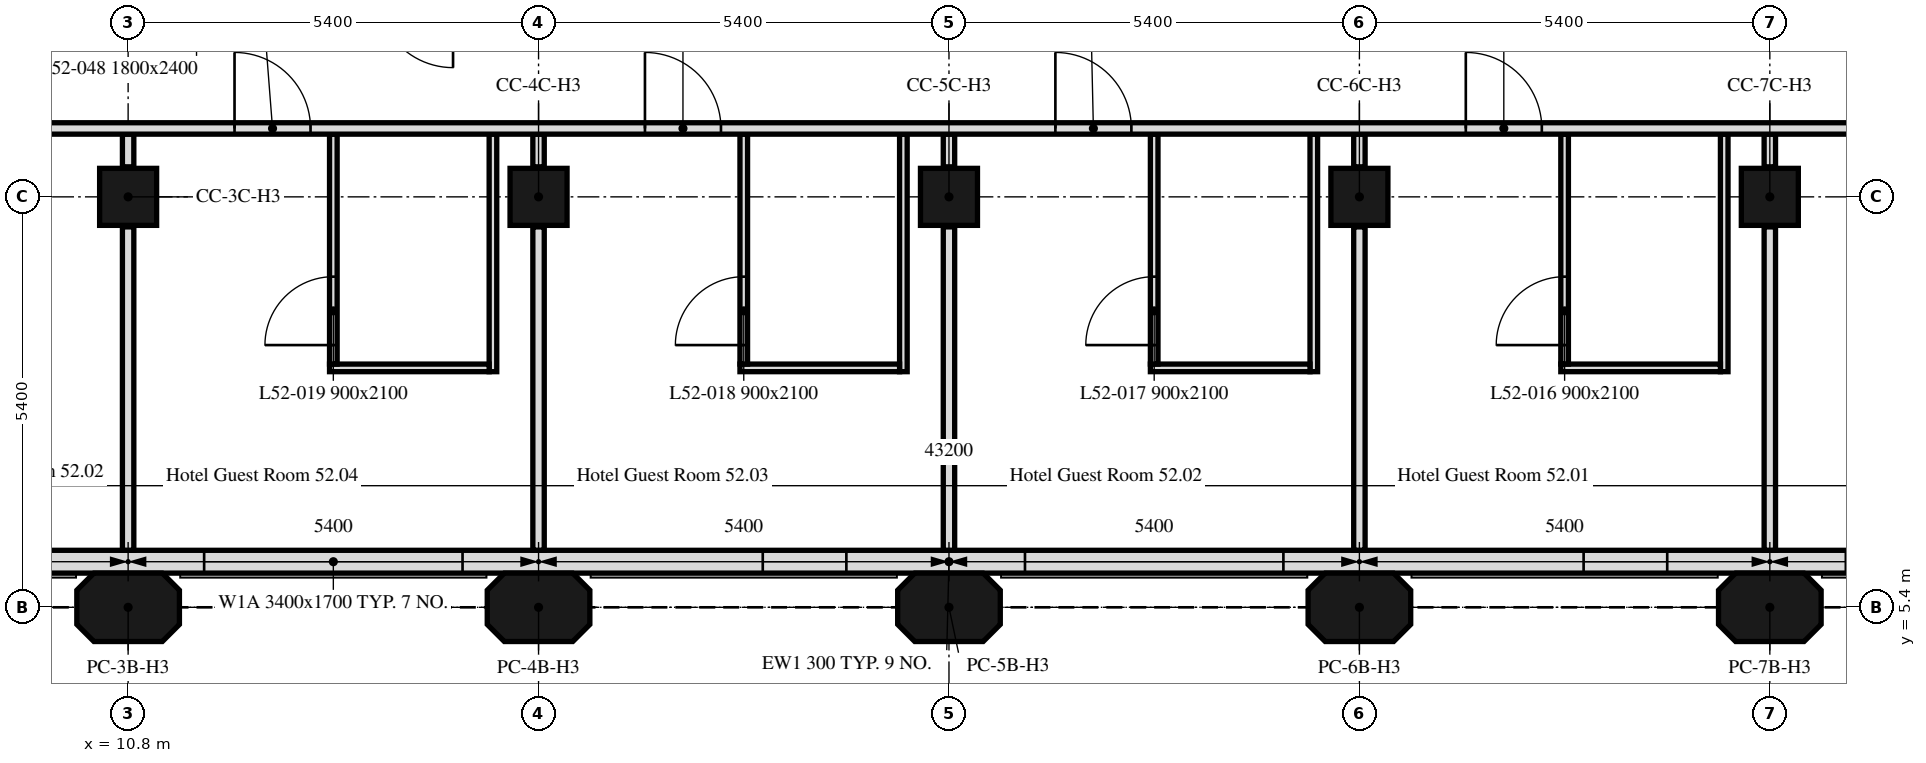
"""IFC4 building model, lengths in metres.
Left out: names, types, materials, properties, quantities, classifications, styles, units other than length and angle.
Written with IfcOpenShell. Run it as: python <this file> out.ifc"""

import sys

from ifc_helpers import new_model, si_unit, direction, frame, frame_2d, origin, origin_2d, place, context, subcontext, project, spatial, polyline, rectangle, outline, extrude, element, fill, save


model = new_model("IFC4")
c1 = context("Model", 3, precision=1e-05, world=origin(), true_north=direction((0.0, 1.0)))
c2 = subcontext(c1, "Body", "Model", "MODEL_VIEW")
j1 = project(units=[si_unit("LENGTHUNIT", "METRE"), si_unit("PLANEANGLEUNIT", "RADIAN")], contexts=[c1])
p1 = place(None, origin())
s1 = spatial("IfcSite", under=j1, at=p1, CompositionType="ELEMENT")
p2 = place(p1, origin())
s2 = spatial("IfcBuilding", under=s1, at=p2, CompositionType="ELEMENT")
p3 = place(p2, frame((0.0, 0.0, 210.4)))
s3 = spatial("IfcBuildingStorey", under=s2, at=p3, CompositionType="ELEMENT", Elevation=210.4)
for number, where, z_axis, x_axis in (
    (1, (10.8, 5.4, 0.0), (0.0, 0.0, 1.0), (1.0, 0.0, 0.0)),
    (2, (16.2, 5.4, 0.0), (0.0, 0.0, 1.0), (1.0, 0.0, 0.0)),
    (3, (21.6, 5.4, 0.0), (0.0, 0.0, 1.0), (1.0, 0.0, 0.0)),
    (4, (27.0, 5.4, 0.0), (0.0, 0.0, 1.0), (1.0, 0.0, 0.0)),
    (5, (32.4, 5.4, 0.0), (0.0, 0.0, 1.0), (1.0, 0.0, 0.0)),
):
    element("IfcColumn", number, at=place(p3, frame(where, z_axis=z_axis, x_axis=x_axis)), inside=s3, PredefinedType="COLUMN", context=c2, shape_type="SweptSolid", body=[
        extrude(outline(polyline([(-0.45, -0.45), (0.45, -0.45), (0.675, -0.225), (0.675, 0.225), (0.45, 0.45), (-0.45, 0.45), (-0.675, 0.225), (-0.675, -0.225), (-0.45, -0.45)])), origin(), (0.0, 0.0, 1.0), 3.0),
    ])
for number, where, z_axis, x_axis in (
    (6, (10.8, 10.8, 0.0), (0.0, 0.0, 1.0), (1.0, 0.0, 0.0)),
    (7, (16.2, 10.8, 0.0), (0.0, 0.0, 1.0), (1.0, 0.0, 0.0)),
    (8, (21.6, 10.8, 0.0), (0.0, 0.0, 1.0), (1.0, 0.0, 0.0)),
    (9, (27.0, 10.8, 0.0), (0.0, 0.0, 1.0), (1.0, 0.0, 0.0)),
    (10, (32.4, 10.8, 0.0), (0.0, 0.0, 1.0), (1.0, 0.0, 0.0)),
):
    element("IfcColumn", number, at=place(p3, frame(where, z_axis=z_axis, x_axis=x_axis)), inside=s3, PredefinedType="COLUMN", context=c2, shape_type="SweptSolid", body=[
        extrude(rectangle(XDim=0.75, YDim=0.75, at=origin_2d()), origin(), (0.0, 0.0, 1.0), 3.0),
    ])
p4 = place(p3, frame((5.586, 6.0, 0.0), z_axis=(0.0, 0.0, 1.0), x_axis=(1.0, 0.0, 0.0)))
e11 = element("IfcWall", 11, at=p4, inside=s3, PredefinedType="SOLIDWALL", context=c2, shape_type="SweptSolid", body=[
    extrude(rectangle(XDim=32.027, YDim=0.3, at=frame_2d((16.014, 0.0))), origin(), (0.0, 0.0, 1.0), 3.0),
])
p5 = place(p4, frame((2.764, 0.0, 0.9)))
e12 = element("IfcOpeningElement", 12, at=p5, cuts=e11, PredefinedType="OPENING", context=c2, shape_type="SweptSolid", body=[
    extrude(rectangle(XDim=1.1, YDim=1.7, at=frame_2d((0.55, 0.85))), frame((0.0, 0.16, 0.0), z_axis=(0.0, -1.0, 0.0), x_axis=(1.0, 0.0, 0.0)), (0.0, 0.0, 1.0), 0.32),
])
p6 = place(p4, frame((6.214, 0.0, 0.9)))
e13 = element("IfcOpeningElement", 13, at=p6, cuts=e11, PredefinedType="OPENING", context=c2, shape_type="SweptSolid", body=[
    extrude(rectangle(XDim=3.4, YDim=1.7, at=frame_2d((1.7, 0.85))), frame((0.0, 0.16, 0.0), z_axis=(0.0, -1.0, 0.0), x_axis=(1.0, 0.0, 0.0)), (0.0, 0.0, 1.0), 0.32),
])
p7 = place(p4, frame((13.564, 0.0, 0.9)))
e14 = element("IfcOpeningElement", 14, at=p7, cuts=e11, PredefinedType="OPENING", context=c2, shape_type="SweptSolid", body=[
    extrude(rectangle(XDim=1.1, YDim=1.7, at=frame_2d((0.55, 0.85))), frame((0.0, 0.16, 0.0), z_axis=(0.0, -1.0, 0.0), x_axis=(1.0, 0.0, 0.0)), (0.0, 0.0, 1.0), 0.32),
])
p8 = place(p4, frame((17.014, 0.0, 0.9)))
e15 = element("IfcOpeningElement", 15, at=p8, cuts=e11, PredefinedType="OPENING", context=c2, shape_type="SweptSolid", body=[
    extrude(rectangle(XDim=3.4, YDim=1.7, at=frame_2d((1.7, 0.85))), frame((0.0, 0.16, 0.0), z_axis=(0.0, -1.0, 0.0), x_axis=(1.0, 0.0, 0.0)), (0.0, 0.0, 1.0), 0.32),
])
p9 = place(p4, frame((24.364, 0.0, 0.9)))
e16 = element("IfcOpeningElement", 16, at=p9, cuts=e11, PredefinedType="OPENING", context=c2, shape_type="SweptSolid", body=[
    extrude(rectangle(XDim=1.1, YDim=1.7, at=frame_2d((0.55, 0.85))), frame((0.0, 0.16, 0.0), z_axis=(0.0, -1.0, 0.0), x_axis=(1.0, 0.0, 0.0)), (0.0, 0.0, 1.0), 0.32),
])
p10 = place(p4, frame((27.814, 0.0, 0.9)))
e17 = element("IfcOpeningElement", 17, at=p10, cuts=e11, PredefinedType="OPENING", context=c2, shape_type="SweptSolid", body=[
    extrude(rectangle(XDim=3.4, YDim=1.7, at=frame_2d((1.7, 0.85))), frame((0.0, 0.16, 0.0), z_axis=(0.0, -1.0, 0.0), x_axis=(1.0, 0.0, 0.0)), (0.0, 0.0, 1.0), 0.32),
])
p11 = place(p3, frame((32.4, 11.625, 0.0), z_axis=(0.0, 0.0, 1.0), x_axis=(0.0, -1.0, 0.0)))
e18 = element("IfcWall", 18, at=p11, inside=s3, PredefinedType="PARTITIONING", context=c2, shape_type="SweptSolid", body=[
    extrude(rectangle(XDim=0.43, YDim=0.15, at=frame_2d((0.215, 0.0))), origin(), (0.0, 0.0, 1.0), 3.0),
])
p12 = place(p3, frame((32.4, 10.405, 0.0), z_axis=(0.0, 0.0, 1.0), x_axis=(0.0, -1.0, 0.0)))
e19 = element("IfcWall", 19, at=p12, inside=s3, PredefinedType="PARTITIONING", context=c2, shape_type="SweptSolid", body=[
    extrude(rectangle(XDim=4.254, YDim=0.15, at=frame_2d((2.127, 0.0))), origin(), (0.0, 0.0, 1.0), 3.0),
])
p13 = place(p3, frame((31.8, 11.625, 0.0), z_axis=(0.0, 0.0, 1.0), x_axis=(0.0, -1.0, 0.0)))
e20 = element("IfcWall", 20, at=p13, inside=s3, PredefinedType="PARTITIONING", context=c2, shape_type="SweptSolid", body=[
    extrude(rectangle(XDim=3.125, YDim=0.1, at=frame_2d((1.562, 0.0))), origin(), (0.0, 0.0, 1.0), 3.0),
])
p14 = place(p3, frame((31.75, 8.55, 0.0), z_axis=(0.0, 0.0, 1.0), x_axis=(-1.0, 0.0, 0.0)))
e21 = element("IfcWall", 21, at=p14, inside=s3, PredefinedType="PARTITIONING", context=c2, shape_type="SweptSolid", body=[
    extrude(rectangle(XDim=2.1, YDim=0.1, at=frame_2d((1.05, 0.0))), origin(), (0.0, 0.0, 1.0), 3.0),
])
p15 = place(p3, frame((29.7, 8.6, 0.0), z_axis=(0.0, 0.0, 1.0), x_axis=(0.0, 1.0, 0.0)))
e22 = element("IfcWall", 22, at=p15, inside=s3, PredefinedType="PARTITIONING", context=c2, shape_type="SweptSolid", body=[
    extrude(rectangle(XDim=3.025, YDim=0.1, at=frame_2d((1.512, 0.0))), origin(), (0.0, 0.0, 1.0), 3.0),
])
p16 = place(p15, frame((0.25, 0.0, 0.0)))
e23 = element("IfcOpeningElement", 23, at=p16, cuts=e22, PredefinedType="OPENING", context=c2, shape_type="SweptSolid", body=[
    extrude(rectangle(XDim=0.9, YDim=2.1, at=frame_2d((0.45, 1.05))), frame((0.0, 0.05, 0.0), z_axis=(0.0, -1.0, 0.0), x_axis=(1.0, 0.0, 0.0)), (0.0, 0.0, 1.0), 0.1),
])
p17 = place(p3, frame((27.0, 11.625, 0.0), z_axis=(0.0, 0.0, 1.0), x_axis=(0.0, -1.0, 0.0)))
e24 = element("IfcWall", 24, at=p17, inside=s3, PredefinedType="PARTITIONING", context=c2, shape_type="SweptSolid", body=[
    extrude(rectangle(XDim=0.43, YDim=0.15, at=frame_2d((0.215, 0.0))), origin(), (0.0, 0.0, 1.0), 3.0),
])
p18 = place(p3, frame((27.0, 10.405, 0.0), z_axis=(0.0, 0.0, 1.0), x_axis=(0.0, -1.0, 0.0)))
e25 = element("IfcWall", 25, at=p18, inside=s3, PredefinedType="PARTITIONING", context=c2, shape_type="SweptSolid", body=[
    extrude(rectangle(XDim=4.254, YDim=0.15, at=frame_2d((2.127, 0.0))), origin(), (0.0, 0.0, 1.0), 3.0),
])
p19 = place(p3, frame((26.4, 11.625, 0.0), z_axis=(0.0, 0.0, 1.0), x_axis=(0.0, -1.0, 0.0)))
e26 = element("IfcWall", 26, at=p19, inside=s3, PredefinedType="PARTITIONING", context=c2, shape_type="SweptSolid", body=[
    extrude(rectangle(XDim=3.125, YDim=0.1, at=frame_2d((1.562, 0.0))), origin(), (0.0, 0.0, 1.0), 3.0),
])
p20 = place(p3, frame((26.35, 8.55, 0.0), z_axis=(0.0, 0.0, 1.0), x_axis=(-1.0, 0.0, 0.0)))
e27 = element("IfcWall", 27, at=p20, inside=s3, PredefinedType="PARTITIONING", context=c2, shape_type="SweptSolid", body=[
    extrude(rectangle(XDim=2.1, YDim=0.1, at=frame_2d((1.05, 0.0))), origin(), (0.0, 0.0, 1.0), 3.0),
])
p21 = place(p3, frame((24.3, 8.6, 0.0), z_axis=(0.0, 0.0, 1.0), x_axis=(0.0, 1.0, 0.0)))
e28 = element("IfcWall", 28, at=p21, inside=s3, PredefinedType="PARTITIONING", context=c2, shape_type="SweptSolid", body=[
    extrude(rectangle(XDim=3.025, YDim=0.1, at=frame_2d((1.512, 0.0))), origin(), (0.0, 0.0, 1.0), 3.0),
])
p22 = place(p21, frame((0.25, 0.0, 0.0)))
e29 = element("IfcOpeningElement", 29, at=p22, cuts=e28, PredefinedType="OPENING", context=c2, shape_type="SweptSolid", body=[
    extrude(rectangle(XDim=0.9, YDim=2.1, at=frame_2d((0.45, 1.05))), frame((0.0, 0.05, 0.0), z_axis=(0.0, -1.0, 0.0), x_axis=(1.0, 0.0, 0.0)), (0.0, 0.0, 1.0), 0.1),
])
p23 = place(p3, frame((21.6, 11.625, 0.0), z_axis=(0.0, 0.0, 1.0), x_axis=(0.0, -1.0, 0.0)))
e30 = element("IfcWall", 30, at=p23, inside=s3, PredefinedType="PARTITIONING", context=c2, shape_type="SweptSolid", body=[
    extrude(rectangle(XDim=0.43, YDim=0.15, at=frame_2d((0.215, 0.0))), origin(), (0.0, 0.0, 1.0), 3.0),
])
p24 = place(p3, frame((21.6, 10.405, 0.0), z_axis=(0.0, 0.0, 1.0), x_axis=(0.0, -1.0, 0.0)))
e31 = element("IfcWall", 31, at=p24, inside=s3, PredefinedType="PARTITIONING", context=c2, shape_type="SweptSolid", body=[
    extrude(rectangle(XDim=4.254, YDim=0.15, at=frame_2d((2.127, 0.0))), origin(), (0.0, 0.0, 1.0), 3.0),
])
p25 = place(p3, frame((21.0, 11.625, 0.0), z_axis=(0.0, 0.0, 1.0), x_axis=(0.0, -1.0, 0.0)))
e32 = element("IfcWall", 32, at=p25, inside=s3, PredefinedType="PARTITIONING", context=c2, shape_type="SweptSolid", body=[
    extrude(rectangle(XDim=3.125, YDim=0.1, at=frame_2d((1.562, 0.0))), origin(), (0.0, 0.0, 1.0), 3.0),
])
p26 = place(p3, frame((20.95, 8.55, 0.0), z_axis=(0.0, 0.0, 1.0), x_axis=(-1.0, 0.0, 0.0)))
e33 = element("IfcWall", 33, at=p26, inside=s3, PredefinedType="PARTITIONING", context=c2, shape_type="SweptSolid", body=[
    extrude(rectangle(XDim=2.1, YDim=0.1, at=frame_2d((1.05, 0.0))), origin(), (0.0, 0.0, 1.0), 3.0),
])
p27 = place(p3, frame((18.9, 8.6, 0.0), z_axis=(0.0, 0.0, 1.0), x_axis=(0.0, 1.0, 0.0)))
e34 = element("IfcWall", 34, at=p27, inside=s3, PredefinedType="PARTITIONING", context=c2, shape_type="SweptSolid", body=[
    extrude(rectangle(XDim=3.025, YDim=0.1, at=frame_2d((1.512, 0.0))), origin(), (0.0, 0.0, 1.0), 3.0),
])
p28 = place(p27, frame((0.25, 0.0, 0.0)))
e35 = element("IfcOpeningElement", 35, at=p28, cuts=e34, PredefinedType="OPENING", context=c2, shape_type="SweptSolid", body=[
    extrude(rectangle(XDim=0.9, YDim=2.1, at=frame_2d((0.45, 1.05))), frame((0.0, 0.05, 0.0), z_axis=(0.0, -1.0, 0.0), x_axis=(1.0, 0.0, 0.0)), (0.0, 0.0, 1.0), 0.1),
])
p29 = place(p3, frame((16.2, 11.625, 0.0), z_axis=(0.0, 0.0, 1.0), x_axis=(0.0, -1.0, 0.0)))
e36 = element("IfcWall", 36, at=p29, inside=s3, PredefinedType="PARTITIONING", context=c2, shape_type="SweptSolid", body=[
    extrude(rectangle(XDim=0.43, YDim=0.15, at=frame_2d((0.215, 0.0))), origin(), (0.0, 0.0, 1.0), 3.0),
])
p30 = place(p3, frame((16.2, 10.405, 0.0), z_axis=(0.0, 0.0, 1.0), x_axis=(0.0, -1.0, 0.0)))
e37 = element("IfcWall", 37, at=p30, inside=s3, PredefinedType="PARTITIONING", context=c2, shape_type="SweptSolid", body=[
    extrude(rectangle(XDim=4.254, YDim=0.15, at=frame_2d((2.127, 0.0))), origin(), (0.0, 0.0, 1.0), 3.0),
])
p31 = place(p3, frame((15.6, 11.625, 0.0), z_axis=(0.0, 0.0, 1.0), x_axis=(0.0, -1.0, 0.0)))
e38 = element("IfcWall", 38, at=p31, inside=s3, PredefinedType="PARTITIONING", context=c2, shape_type="SweptSolid", body=[
    extrude(rectangle(XDim=3.125, YDim=0.1, at=frame_2d((1.562, 0.0))), origin(), (0.0, 0.0, 1.0), 3.0),
])
p32 = place(p3, frame((15.55, 8.55, 0.0), z_axis=(0.0, 0.0, 1.0), x_axis=(-1.0, 0.0, 0.0)))
e39 = element("IfcWall", 39, at=p32, inside=s3, PredefinedType="PARTITIONING", context=c2, shape_type="SweptSolid", body=[
    extrude(rectangle(XDim=2.1, YDim=0.1, at=frame_2d((1.05, 0.0))), origin(), (0.0, 0.0, 1.0), 3.0),
])
p33 = place(p3, frame((13.5, 8.6, 0.0), z_axis=(0.0, 0.0, 1.0), x_axis=(0.0, 1.0, 0.0)))
e40 = element("IfcWall", 40, at=p33, inside=s3, PredefinedType="PARTITIONING", context=c2, shape_type="SweptSolid", body=[
    extrude(rectangle(XDim=3.025, YDim=0.1, at=frame_2d((1.512, 0.0))), origin(), (0.0, 0.0, 1.0), 3.0),
])
p34 = place(p33, frame((0.25, 0.0, 0.0)))
e41 = element("IfcOpeningElement", 41, at=p34, cuts=e40, PredefinedType="OPENING", context=c2, shape_type="SweptSolid", body=[
    extrude(rectangle(XDim=0.9, YDim=2.1, at=frame_2d((0.45, 1.05))), frame((0.0, 0.05, 0.0), z_axis=(0.0, -1.0, 0.0), x_axis=(1.0, 0.0, 0.0)), (0.0, 0.0, 1.0), 0.1),
])
p35 = place(p3, frame((10.8, 11.625, 0.0), z_axis=(0.0, 0.0, 1.0), x_axis=(0.0, -1.0, 0.0)))
e42 = element("IfcWall", 42, at=p35, inside=s3, PredefinedType="PARTITIONING", context=c2, shape_type="SweptSolid", body=[
    extrude(rectangle(XDim=0.43, YDim=0.15, at=frame_2d((0.215, 0.0))), origin(), (0.0, 0.0, 1.0), 3.0),
])
p36 = place(p3, frame((10.8, 10.405, 0.0), z_axis=(0.0, 0.0, 1.0), x_axis=(0.0, -1.0, 0.0)))
e43 = element("IfcWall", 43, at=p36, inside=s3, PredefinedType="PARTITIONING", context=c2, shape_type="SweptSolid", body=[
    extrude(rectangle(XDim=4.254, YDim=0.15, at=frame_2d((2.127, 0.0))), origin(), (0.0, 0.0, 1.0), 3.0),
])
p37 = place(p3, frame((0.751, 11.7, 0.0), z_axis=(0.0, 0.0, 1.0), x_axis=(1.0, 0.0, 0.0)))
e44 = element("IfcWall", 44, at=p37, inside=s3, PredefinedType="PARTITIONING", context=c2, shape_type="SweptSolid", body=[
    extrude(rectangle(XDim=41.698, YDim=0.15, at=frame_2d((20.849, 0.0))), origin(), (0.0, 0.0, 1.0), 3.0),
])
p38 = place(p37, frame((39.249, 0.0, 0.0)))
e45 = element("IfcOpeningElement", 45, at=p38, cuts=e44, PredefinedType="OPENING", context=c2, shape_type="SweptSolid", body=[
    extrude(rectangle(XDim=1.0, YDim=2.1, at=frame_2d((0.5, 1.05))), frame((0.0, 0.075, 0.0), z_axis=(0.0, -1.0, 0.0), x_axis=(1.0, 0.0, 0.0)), (0.0, 0.0, 1.0), 0.15),
])
p39 = place(p37, frame((27.649, 0.0, 0.0)))
e46 = element("IfcOpeningElement", 46, at=p39, cuts=e44, PredefinedType="OPENING", context=c2, shape_type="SweptSolid", body=[
    extrude(rectangle(XDim=1.0, YDim=2.1, at=frame_2d((0.5, 1.05))), frame((0.0, 0.075, 0.0), z_axis=(0.0, -1.0, 0.0), x_axis=(1.0, 0.0, 0.0)), (0.0, 0.0, 1.0), 0.15),
])
p40 = place(p37, frame((22.249, 0.0, 0.0)))
e47 = element("IfcOpeningElement", 47, at=p40, cuts=e44, PredefinedType="OPENING", context=c2, shape_type="SweptSolid", body=[
    extrude(rectangle(XDim=1.0, YDim=2.1, at=frame_2d((0.5, 1.05))), frame((0.0, 0.075, 0.0), z_axis=(0.0, -1.0, 0.0), x_axis=(1.0, 0.0, 0.0)), (0.0, 0.0, 1.0), 0.15),
])
p41 = place(p37, frame((16.849, 0.0, 0.0)))
e48 = element("IfcOpeningElement", 48, at=p41, cuts=e44, PredefinedType="OPENING", context=c2, shape_type="SweptSolid", body=[
    extrude(rectangle(XDim=1.0, YDim=2.1, at=frame_2d((0.5, 1.05))), frame((0.0, 0.075, 0.0), z_axis=(0.0, -1.0, 0.0), x_axis=(1.0, 0.0, 0.0)), (0.0, 0.0, 1.0), 0.15),
])
p42 = place(p37, frame((11.449, 0.0, 0.0)))
e49 = element("IfcOpeningElement", 49, at=p42, cuts=e44, PredefinedType="OPENING", context=c2, shape_type="SweptSolid", body=[
    extrude(rectangle(XDim=1.0, YDim=2.1, at=frame_2d((0.5, 1.05))), frame((0.0, 0.075, 0.0), z_axis=(0.0, -1.0, 0.0), x_axis=(1.0, 0.0, 0.0)), (0.0, 0.0, 1.0), 0.15),
])
p43 = place(p37, frame((2.744, 0.0, 0.0)))
e50 = element("IfcOpeningElement", 50, at=p43, cuts=e44, PredefinedType="OPENING", context=c2, shape_type="SweptSolid", body=[
    extrude(rectangle(XDim=1.0, YDim=2.1, at=frame_2d((0.5, 1.05))), frame((0.0, 0.075, 0.0), z_axis=(0.0, -1.0, 0.0), x_axis=(1.0, 0.0, 0.0)), (0.0, 0.0, 1.0), 0.15),
])
p44 = place(p6, origin())
e51 = element("IfcWindow", 51, at=p44, inside=s3, PartitioningType="SINGLE_PANEL", PredefinedType="WINDOW", context=c2, shape_type="SweptSolid", body=[
    extrude(rectangle(XDim=3.4, YDim=1.7, at=frame_2d((1.7, 0.85))), frame((0.0, 0.03, 0.0), z_axis=(0.0, -1.0, 0.0), x_axis=(1.0, 0.0, 0.0)), (0.0, 0.0, 1.0), 0.06),
])
fill(e13, e51)
p45 = place(p7, origin())
e52 = element("IfcWindow", 52, at=p45, inside=s3, PartitioningType="SINGLE_PANEL", PredefinedType="WINDOW", context=c2, shape_type="SweptSolid", body=[
    extrude(rectangle(XDim=1.1, YDim=1.7, at=frame_2d((0.55, 0.85))), frame((0.0, 0.03, 0.0), z_axis=(0.0, -1.0, 0.0), x_axis=(1.0, 0.0, 0.0)), (0.0, 0.0, 1.0), 0.06),
])
fill(e14, e52)
p46 = place(p8, origin())
e53 = element("IfcWindow", 53, at=p46, inside=s3, PartitioningType="SINGLE_PANEL", PredefinedType="WINDOW", context=c2, shape_type="SweptSolid", body=[
    extrude(rectangle(XDim=3.4, YDim=1.7, at=frame_2d((1.7, 0.85))), frame((0.0, 0.03, 0.0), z_axis=(0.0, -1.0, 0.0), x_axis=(1.0, 0.0, 0.0)), (0.0, 0.0, 1.0), 0.06),
])
fill(e15, e53)
p47 = place(p9, origin())
e54 = element("IfcWindow", 54, at=p47, inside=s3, PartitioningType="SINGLE_PANEL", PredefinedType="WINDOW", context=c2, shape_type="SweptSolid", body=[
    extrude(rectangle(XDim=1.1, YDim=1.7, at=frame_2d((0.55, 0.85))), frame((0.0, 0.03, 0.0), z_axis=(0.0, -1.0, 0.0), x_axis=(1.0, 0.0, 0.0)), (0.0, 0.0, 1.0), 0.06),
])
fill(e16, e54)
p48 = place(p16, origin())
e55 = element("IfcDoor", 55, at=p48, inside=s3, OperationType="SINGLE_SWING_LEFT", PredefinedType="DOOR", context=c2, shape_type="SweptSolid", body=[
    extrude(rectangle(XDim=0.9, YDim=2.1, at=frame_2d((0.45, 1.05))), frame((0.0, 0.025, 0.0), z_axis=(0.0, -1.0, 0.0), x_axis=(1.0, 0.0, 0.0)), (0.0, 0.0, 1.0), 0.05),
])
fill(e23, e55)
p49 = place(p22, origin())
e56 = element("IfcDoor", 56, at=p49, inside=s3, OperationType="SINGLE_SWING_RIGHT", PredefinedType="DOOR", context=c2, shape_type="SweptSolid", body=[
    extrude(rectangle(XDim=0.9, YDim=2.1, at=frame_2d((0.45, 1.05))), frame((0.0, 0.025, 0.0), z_axis=(0.0, -1.0, 0.0), x_axis=(1.0, 0.0, 0.0)), (0.0, 0.0, 1.0), 0.05),
])
fill(e29, e56)
p50 = place(p28, origin())
e57 = element("IfcDoor", 57, at=p50, inside=s3, OperationType="SINGLE_SWING_RIGHT", PredefinedType="DOOR", context=c2, shape_type="SweptSolid", body=[
    extrude(rectangle(XDim=0.9, YDim=2.1, at=frame_2d((0.45, 1.05))), frame((0.0, 0.025, 0.0), z_axis=(0.0, -1.0, 0.0), x_axis=(1.0, 0.0, 0.0)), (0.0, 0.0, 1.0), 0.05),
])
fill(e35, e57)
p51 = place(p34, origin())
e58 = element("IfcDoor", 58, at=p51, inside=s3, OperationType="SINGLE_SWING_LEFT", PredefinedType="DOOR", context=c2, shape_type="SweptSolid", body=[
    extrude(rectangle(XDim=0.9, YDim=2.1, at=frame_2d((0.45, 1.05))), frame((0.0, 0.025, 0.0), z_axis=(0.0, -1.0, 0.0), x_axis=(1.0, 0.0, 0.0)), (0.0, 0.0, 1.0), 0.05),
])
fill(e41, e58)
p52 = place(p39, origin())
e59 = element("IfcDoor", 59, at=p52, inside=s3, OperationType="SINGLE_SWING_RIGHT", PredefinedType="DOOR", context=c2, shape_type="SweptSolid", body=[
    extrude(rectangle(XDim=1.0, YDim=2.1, at=frame_2d((0.5, 1.05))), frame((0.0, 0.025, 0.0), z_axis=(0.0, -1.0, 0.0), x_axis=(1.0, 0.0, 0.0)), (0.0, 0.0, 1.0), 0.05),
])
fill(e46, e59)
p53 = place(p40, origin())
e60 = element("IfcDoor", 60, at=p53, inside=s3, OperationType="SINGLE_SWING_RIGHT", PredefinedType="DOOR", context=c2, shape_type="SweptSolid", body=[
    extrude(rectangle(XDim=1.0, YDim=2.1, at=frame_2d((0.5, 1.05))), frame((0.0, 0.025, 0.0), z_axis=(0.0, -1.0, 0.0), x_axis=(1.0, 0.0, 0.0)), (0.0, 0.0, 1.0), 0.05),
])
fill(e47, e60)
p54 = place(p41, origin())
e61 = element("IfcDoor", 61, at=p54, inside=s3, OperationType="SINGLE_SWING_LEFT", PredefinedType="DOOR", context=c2, shape_type="SweptSolid", body=[
    extrude(rectangle(XDim=1.0, YDim=2.1, at=frame_2d((0.5, 1.05))), frame((0.0, 0.025, 0.0), z_axis=(0.0, -1.0, 0.0), x_axis=(1.0, 0.0, 0.0)), (0.0, 0.0, 1.0), 0.05),
])
fill(e48, e61)
p55 = place(p42, origin())
e62 = element("IfcDoor", 62, at=p55, inside=s3, OperationType="SINGLE_SWING_LEFT", PredefinedType="DOOR", context=c2, shape_type="SweptSolid", body=[
    extrude(rectangle(XDim=1.0, YDim=2.1, at=frame_2d((0.5, 1.05))), frame((0.0, 0.025, 0.0), z_axis=(0.0, -1.0, 0.0), x_axis=(1.0, 0.0, 0.0)), (0.0, 0.0, 1.0), 0.05),
])
fill(e49, e62)
save(model, sys.argv[1])
